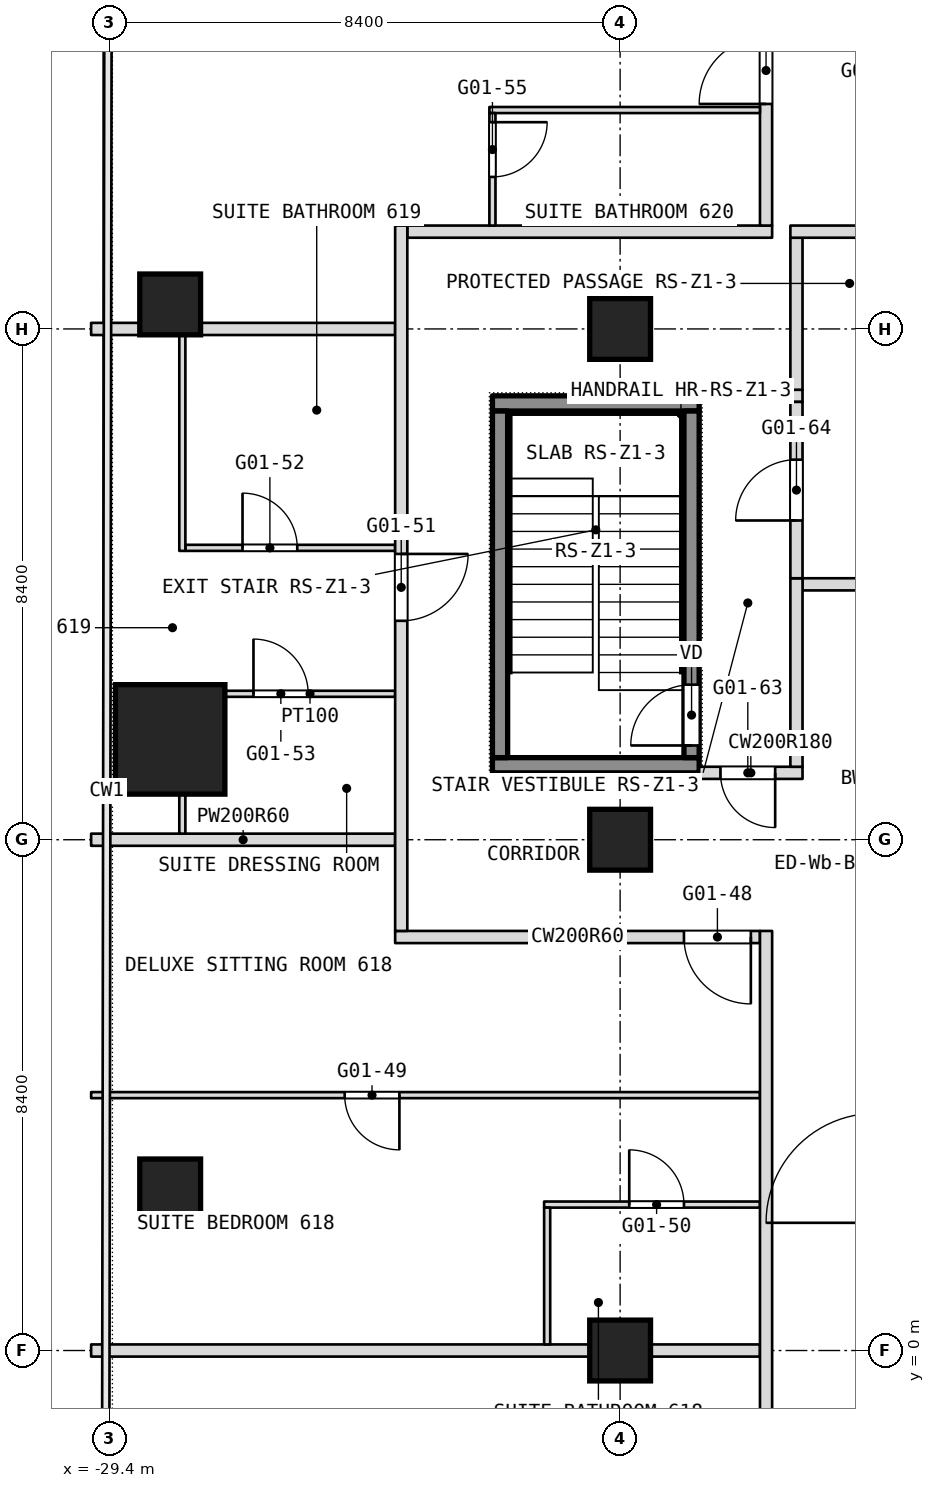
"""IFC4 building model, lengths in metres.
Left out: names, types, materials, properties, quantities, classifications, styles, units other than length and angle.
Written with IfcOpenShell. Run it as: python <this file> out.ifc"""

import sys

from ifc_helpers import new_model, si_unit, direction, frame, frame_2d, origin, origin_2d, place, context, subcontext, project, spatial, rectangle, extrude, element, fill, save


model = new_model("IFC4")
c1 = context("Model", 3, precision=1e-05, world=origin(), true_north=direction((0.0, 1.0)))
c2 = subcontext(c1, "Body", "Model", "MODEL_VIEW")
j1 = project(units=[si_unit("LENGTHUNIT", "METRE"), si_unit("PLANEANGLEUNIT", "RADIAN")], contexts=[c1])
p1 = place(None, origin())
s1 = spatial("IfcSite", under=j1, at=p1, CompositionType="ELEMENT")
p2 = place(p1, origin())
s2 = spatial("IfcBuilding", under=s1, at=p2, CompositionType="ELEMENT")
p3 = place(p2, frame((0.0, 0.0, 36.5)))
s3 = spatial("IfcBuildingStorey", under=s2, at=p3, CompositionType="ELEMENT", Elevation=36.5)
p4 = place(p3, frame((-28.4, 10.05, 0.0), z_axis=(0.0, 0.0, 1.0), x_axis=(1.0, 0.0, 0.0)))
e1 = element("IfcColumn", 1, at=p4, inside=s3, PredefinedType="COLUMN", context=c2, shape_type="SweptSolid", body=[
    extrude(rectangle(XDim=1.8, YDim=1.8, at=origin_2d()), origin(), (0.0, 0.0, 1.0), 3.6),
])
for number, where, z_axis, x_axis in (
    (2, (-21.0, 0.0, 0.0), (0.0, 0.0, 1.0), (1.0, 0.0, 0.0)),
    (3, (-21.0, 8.4, 0.0), (0.0, 0.0, 1.0), (1.0, 0.0, 0.0)),
    (4, (-21.0, 16.8, 0.0), (0.0, 0.0, 1.0), (1.0, 0.0, 0.0)),
    (5, (-28.4, 2.649, 0.0), (0.0, 0.0, 1.0), (1.0, 0.0, 0.0)),
    (6, (-28.4, 17.203, 0.0), (0.0, 0.0, 1.0), (1.0, 0.0, 0.0)),
):
    element("IfcColumn", number, at=place(p3, frame(where, z_axis=z_axis, x_axis=x_axis)), inside=s3, PredefinedType="COLUMN", context=c2, shape_type="SweptSolid", body=[
        extrude(rectangle(XDim=1.0, YDim=1.0, at=origin_2d()), origin(), (0.0, 0.0, 1.0), 3.6),
    ])
p5 = place(p3, frame((-29.7, 0.0, 0.0), z_axis=(0.0, 0.0, 1.0), x_axis=(1.0, 0.0, 0.0)))
e7 = element("IfcWall", 7, at=p5, inside=s3, PredefinedType="PARTITIONING", context=c2, shape_type="SweptSolid", body=[
    extrude(rectangle(XDim=11.0, YDim=0.2, at=frame_2d((5.5, 0.0))), origin(), (0.0, 0.0, 1.0), 2.84),
])
p6 = place(p3, frame((-22.25, 2.4, 0.0), z_axis=(0.0, 0.0, 1.0), x_axis=(1.0, 0.0, 0.0)))
e8 = element("IfcWall", 8, at=p6, inside=s3, PredefinedType="PARTITIONING", context=c2, shape_type="SweptSolid", body=[
    extrude(rectangle(XDim=3.55, YDim=0.1, at=frame_2d((1.775, 0.0))), origin(), (0.0, 0.0, 1.0), 3.34),
])
p7 = place(p6, frame((1.4, 0.0, 0.0)))
e9 = element("IfcOpeningElement", 9, at=p7, cuts=e8, PredefinedType="OPENING", context=c2, shape_type="SweptSolid", body=[
    extrude(rectangle(XDim=0.9, YDim=2.1, at=frame_2d((0.45, 1.05))), frame((0.0, 0.05, 0.0), z_axis=(0.0, -1.0, 0.0), x_axis=(1.0, 0.0, 0.0)), (0.0, 0.0, 1.0), 0.1),
])
p8 = place(p3, frame((-29.7, 4.2, 0.0), z_axis=(0.0, 0.0, 1.0), x_axis=(1.0, 0.0, 0.0)))
e10 = element("IfcWall", 10, at=p8, inside=s3, PredefinedType="PARTITIONING", context=c2, shape_type="SweptSolid", body=[
    extrude(rectangle(XDim=11.0, YDim=0.1, at=frame_2d((5.5, 0.0))), origin(), (0.0, 0.0, 1.0), 3.34),
])
p9 = place(p8, frame((4.17, 0.0, 0.0)))
e11 = element("IfcOpeningElement", 11, at=p9, cuts=e10, PredefinedType="OPENING", context=c2, shape_type="SweptSolid", body=[
    extrude(rectangle(XDim=0.9, YDim=2.1, at=frame_2d((0.45, 1.05))), frame((0.0, 0.05, 0.0), z_axis=(0.0, -1.0, 0.0), x_axis=(1.0, 0.0, 0.0)), (0.0, 0.0, 1.0), 0.1),
])
p10 = place(p3, frame((-24.7, 6.8, 0.0), z_axis=(0.0, 0.0, 1.0), x_axis=(1.0, 0.0, 0.0)))
e12 = element("IfcWall", 12, at=p10, inside=s3, PredefinedType="PARTITIONING", context=c2, shape_type="SweptSolid", body=[
    extrude(rectangle(XDim=6.0, YDim=0.2, at=frame_2d((3.0, 0.0))), origin(), (0.0, 0.0, 1.0), 3.34),
])
p11 = place(p10, frame((4.75, 0.0, 0.0)))
e13 = element("IfcOpeningElement", 13, at=p11, cuts=e12, PredefinedType="OPENING", context=c2, shape_type="SweptSolid", body=[
    extrude(rectangle(XDim=1.1, YDim=2.1, at=frame_2d((0.55, 1.05))), frame((0.0, 0.1, 0.0), z_axis=(0.0, -1.0, 0.0), x_axis=(1.0, 0.0, 0.0)), (0.0, 0.0, 1.0), 0.2),
])
p12 = place(p3, frame((-29.7, 8.4, 0.0), z_axis=(0.0, 0.0, 1.0), x_axis=(1.0, 0.0, 0.0)))
e14 = element("IfcWall", 14, at=p12, inside=s3, PredefinedType="PARTITIONING", context=c2, shape_type="SweptSolid", body=[
    extrude(rectangle(XDim=5.0, YDim=0.2, at=frame_2d((2.5, 0.0))), origin(), (0.0, 0.0, 1.0), 2.84),
])
p13 = place(p3, frame((-19.7, 9.5, 0.0), z_axis=(0.0, 0.0, 1.0), x_axis=(1.0, 0.0, 0.0)))
e15 = element("IfcWall", 15, at=p13, inside=s3, PredefinedType="PARTITIONING", context=c2, shape_type="SweptSolid", body=[
    extrude(rectangle(XDim=1.7, YDim=0.2, at=frame_2d((0.85, 0.0))), origin(), (0.0, 0.0, 1.0), 3.34),
])
p14 = place(p13, frame((0.35, 0.0, 0.0)))
e16 = element("IfcOpeningElement", 16, at=p14, cuts=e15, PredefinedType="OPENING", context=c2, shape_type="SweptSolid", body=[
    extrude(rectangle(XDim=0.9, YDim=2.1, at=frame_2d((0.45, 1.05))), frame((0.0, 0.1, 0.0), z_axis=(0.0, -1.0, 0.0), x_axis=(1.0, 0.0, 0.0)), (0.0, 0.0, 1.0), 0.2),
])
p15 = place(p3, frame((-27.5, 10.8, 0.0), z_axis=(0.0, 0.0, 1.0), x_axis=(1.0, 0.0, 0.0)))
e17 = element("IfcWall", 17, at=p15, inside=s3, PredefinedType="PARTITIONING", context=c2, shape_type="SweptSolid", body=[
    extrude(rectangle(XDim=2.8, YDim=0.1, at=frame_2d((1.4, 0.0))), origin(), (0.0, 0.0, 1.0), 3.34),
])
p16 = place(p15, frame((0.47, 0.0, 0.0)))
e18 = element("IfcOpeningElement", 18, at=p16, cuts=e17, PredefinedType="OPENING", context=c2, shape_type="SweptSolid", body=[
    extrude(rectangle(XDim=0.9, YDim=2.1, at=frame_2d((0.45, 1.05))), frame((0.0, 0.05, 0.0), z_axis=(0.0, -1.0, 0.0), x_axis=(1.0, 0.0, 0.0)), (0.0, 0.0, 1.0), 0.1),
])
p17 = place(p3, frame((-18.0, 12.6, 0.0), z_axis=(0.0, 0.0, 1.0), x_axis=(1.0, 0.0, 0.0)))
e19 = element("IfcWall", 19, at=p17, inside=s3, PredefinedType="PARTITIONING", context=c2, shape_type="SweptSolid", body=[
    extrude(rectangle(XDim=1.1, YDim=0.2, at=frame_2d((0.55, 0.0))), origin(), (0.0, 0.0, 1.0), 3.34),
])
p18 = place(p3, frame((-28.15, 13.2, 0.0), z_axis=(0.0, 0.0, 1.0), x_axis=(1.0, 0.0, 0.0)))
e20 = element("IfcWall", 20, at=p18, inside=s3, PredefinedType="PARTITIONING", context=c2, shape_type="SweptSolid", body=[
    extrude(rectangle(XDim=3.45, YDim=0.1, at=frame_2d((1.725, 0.0))), origin(), (0.0, 0.0, 1.0), 3.34),
])
p19 = place(p18, frame((0.94, 0.0, 0.0)))
e21 = element("IfcOpeningElement", 21, at=p19, cuts=e20, PredefinedType="OPENING", context=c2, shape_type="SweptSolid", body=[
    extrude(rectangle(XDim=0.9, YDim=2.1, at=frame_2d((0.45, 1.05))), frame((0.0, 0.05, 0.0), z_axis=(0.0, -1.0, 0.0), x_axis=(1.0, 0.0, 0.0)), (0.0, 0.0, 1.0), 0.1),
])
p20 = place(p3, frame((-19.7, 15.7, 0.0), z_axis=(0.0, 0.0, 1.0), x_axis=(1.0, 0.0, 0.0)))
e22 = element("IfcWall", 22, at=p20, inside=s3, PredefinedType="PARTITIONING", context=c2, shape_type="SweptSolid", body=[
    extrude(rectangle(XDim=1.7, YDim=0.2, at=frame_2d((0.85, 0.0))), origin(), (0.0, 0.0, 1.0), 3.34),
])
p21 = place(p3, frame((-29.7, 16.8, 0.0), z_axis=(0.0, 0.0, 1.0), x_axis=(1.0, 0.0, 0.0)))
e23 = element("IfcWall", 23, at=p21, inside=s3, PredefinedType="PARTITIONING", context=c2, shape_type="SweptSolid", body=[
    extrude(rectangle(XDim=5.0, YDim=0.2, at=frame_2d((2.5, 0.0))), origin(), (0.0, 0.0, 1.0), 2.84),
])
p22 = place(p3, frame((-18.1, 9.6, 0.0), z_axis=(0.0, 0.0, 1.0), x_axis=(0.0, 1.0, 0.0)))
e24 = element("IfcWall", 24, at=p22, inside=s3, PredefinedType="PARTITIONING", context=c2, shape_type="SweptSolid", body=[
    extrude(rectangle(XDim=3.1, YDim=0.2, at=frame_2d((1.55, 0.0))), origin(), (0.0, 0.0, 1.0), 3.34),
])
p23 = place(p3, frame((-18.1, 15.8, 0.0), z_axis=(0.0, 0.0, 1.0), x_axis=(0.0, 1.0, 0.0)))
e25 = element("IfcWall", 25, at=p23, inside=s3, PredefinedType="PARTITIONING", context=c2, shape_type="SweptSolid", body=[
    extrude(rectangle(XDim=2.5, YDim=0.2, at=frame_2d((1.25, 0.0))), origin(), (0.0, 0.0, 1.0), 3.34),
])
p24 = place(p3, frame((-18.1, 12.7, 0.0), z_axis=(0.0, 0.0, 1.0), x_axis=(0.0, 1.0, 0.0)))
e26 = element("IfcWall", 26, at=p24, inside=s3, PredefinedType="PARTITIONING", context=c2, shape_type="SweptSolid", body=[
    extrude(rectangle(XDim=2.9, YDim=0.2, at=frame_2d((1.45, 0.0))), origin(), (0.0, 0.0, 1.0), 3.34),
])
p25 = place(p24, frame((0.95, 0.0, 0.0)))
e27 = element("IfcOpeningElement", 27, at=p25, cuts=e26, PredefinedType="OPENING", context=c2, shape_type="SweptSolid", body=[
    extrude(rectangle(XDim=1.0, YDim=2.1, at=frame_2d((0.5, 1.05))), frame((0.0, 0.1, 0.0), z_axis=(0.0, -1.0, 0.0), x_axis=(1.0, 0.0, 0.0)), (0.0, 0.0, 1.0), 0.2),
])
p26 = place(p3, frame((-24.5, 18.4, 0.0), z_axis=(0.0, 0.0, 1.0), x_axis=(1.0, 0.0, 0.0)))
e28 = element("IfcWall", 28, at=p26, inside=s3, PredefinedType="PARTITIONING", context=c2, shape_type="SweptSolid", body=[
    extrude(rectangle(XDim=6.0, YDim=0.2, at=frame_2d((3.0, 0.0))), origin(), (0.0, 0.0, 1.0), 3.34),
])
p27 = place(p3, frame((-18.2, 18.4, 0.0), z_axis=(0.0, 0.0, 1.0), x_axis=(1.0, 0.0, 0.0)))
e29 = element("IfcWall", 29, at=p27, inside=s3, PredefinedType="PARTITIONING", context=c2, shape_type="SweptSolid", body=[
    extrude(rectangle(XDim=5.0, YDim=0.2, at=frame_2d((2.5, 0.0))), origin(), (0.0, 0.0, 1.0), 3.34),
])
p28 = place(p3, frame((-18.6, -16.665, 0.0), z_axis=(0.0, 0.0, 1.0), x_axis=(0.0, 1.0, 0.0)))
e30 = element("IfcWall", 30, at=p28, inside=s3, PredefinedType="PARTITIONING", context=c2, shape_type="SweptSolid", body=[
    extrude(rectangle(XDim=23.565, YDim=0.2, at=frame_2d((11.782, 0.0))), origin(), (0.0, 0.0, 1.0), 3.34),
])
p29 = place(p28, frame((2.991, 0.0, 0.0)))
e31 = element("IfcOpeningElement", 31, at=p29, cuts=e30, PredefinedType="OPENING", context=c2, shape_type="SweptSolid", body=[
    extrude(rectangle(XDim=1.0, YDim=2.1, at=frame_2d((0.5, 1.05))), frame((0.0, 0.1, 0.0), z_axis=(0.0, -1.0, 0.0), x_axis=(1.0, 0.0, 0.0)), (0.0, 0.0, 1.0), 0.2),
])
p30 = place(p28, frame((4.574, 0.0, 0.0)))
e32 = element("IfcOpeningElement", 32, at=p30, cuts=e30, PredefinedType="OPENING", context=c2, shape_type="SweptSolid", body=[
    extrude(rectangle(XDim=1.0, YDim=2.1, at=frame_2d((0.5, 1.05))), frame((0.0, 0.1, 0.0), z_axis=(0.0, -1.0, 0.0), x_axis=(1.0, 0.0, 0.0)), (0.0, 0.0, 1.0), 0.2),
])
p31 = place(p28, frame((11.565, 0.0, 0.0)))
e33 = element("IfcOpeningElement", 33, at=p31, cuts=e30, PredefinedType="OPENING", context=c2, shape_type="SweptSolid", body=[
    extrude(rectangle(XDim=1.8, YDim=2.1, at=frame_2d((0.9, 1.05))), frame((0.0, 0.1, 0.0), z_axis=(0.0, -1.0, 0.0), x_axis=(1.0, 0.0, 0.0)), (0.0, 0.0, 1.0), 0.2),
])
p32 = place(p3, frame((-18.6, 18.5, 0.0), z_axis=(0.0, 0.0, 1.0), x_axis=(0.0, 1.0, 0.0)))
e34 = element("IfcWall", 34, at=p32, inside=s3, PredefinedType="PARTITIONING", context=c2, shape_type="SweptSolid", body=[
    extrude(rectangle(XDim=15.04, YDim=0.2, at=frame_2d((7.52, 0.0))), origin(), (0.0, 0.0, 1.0), 3.34),
])
p33 = place(p32, frame((2.0, 0.0, 0.0)))
e35 = element("IfcOpeningElement", 35, at=p33, cuts=e34, PredefinedType="OPENING", context=c2, shape_type="SweptSolid", body=[
    extrude(rectangle(XDim=1.1, YDim=2.1, at=frame_2d((0.55, 1.05))), frame((0.0, 0.1, 0.0), z_axis=(0.0, -1.0, 0.0), x_axis=(1.0, 0.0, 0.0)), (0.0, 0.0, 1.0), 0.2),
])
p34 = place(p32, frame((8.25, 0.0, 0.0)))
e36 = element("IfcOpeningElement", 36, at=p34, cuts=e34, PredefinedType="OPENING", context=c2, shape_type="SweptSolid", body=[
    extrude(rectangle(XDim=1.1, YDim=2.1, at=frame_2d((0.55, 1.05))), frame((0.0, 0.1, 0.0), z_axis=(0.0, -1.0, 0.0), x_axis=(1.0, 0.0, 0.0)), (0.0, 0.0, 1.0), 0.2),
])
p35 = place(p3, frame((-23.15, 20.4, 0.0), z_axis=(0.0, 0.0, 1.0), x_axis=(1.0, 0.0, 0.0)))
e37 = element("IfcWall", 37, at=p35, inside=s3, PredefinedType="PARTITIONING", context=c2, shape_type="SweptSolid", body=[
    extrude(rectangle(XDim=4.45, YDim=0.1, at=frame_2d((2.225, 0.0))), origin(), (0.0, 0.0, 1.0), 3.34),
])
p36 = place(p3, frame((-22.2, 0.1, 0.0), z_axis=(0.0, 0.0, 1.0), x_axis=(0.0, 1.0, 0.0)))
e38 = element("IfcWall", 38, at=p36, inside=s3, PredefinedType="PARTITIONING", context=c2, shape_type="SweptSolid", body=[
    extrude(rectangle(XDim=2.25, YDim=0.1, at=frame_2d((1.125, 0.0))), origin(), (0.0, 0.0, 1.0), 3.34),
])
p37 = place(p3, frame((-23.1, 18.5, 0.0), z_axis=(0.0, 0.0, 1.0), x_axis=(0.0, 1.0, 0.0)))
e39 = element("IfcWall", 39, at=p37, inside=s3, PredefinedType="PARTITIONING", context=c2, shape_type="SweptSolid", body=[
    extrude(rectangle(XDim=1.85, YDim=0.1, at=frame_2d((0.925, 0.0))), origin(), (0.0, 0.0, 1.0), 3.34),
])
p38 = place(p37, frame((0.8, 0.0, 0.0)))
e40 = element("IfcOpeningElement", 40, at=p38, cuts=e39, PredefinedType="OPENING", context=c2, shape_type="SweptSolid", body=[
    extrude(rectangle(XDim=0.9, YDim=2.1, at=frame_2d((0.45, 1.05))), frame((0.0, 0.05, 0.0), z_axis=(0.0, -1.0, 0.0), x_axis=(1.0, 0.0, 0.0)), (0.0, 0.0, 1.0), 0.1),
])
p39 = place(p3, frame((-24.6, 6.9, 0.0), z_axis=(0.0, 0.0, 1.0), x_axis=(0.0, 1.0, 0.0)))
e41 = element("IfcWall", 41, at=p39, inside=s3, PredefinedType="PARTITIONING", context=c2, shape_type="SweptSolid", body=[
    extrude(rectangle(XDim=11.6, YDim=0.2, at=frame_2d((5.8, 0.0))), origin(), (0.0, 0.0, 1.0), 3.34),
])
p40 = place(p39, frame((5.1, 0.0, 0.0)))
e42 = element("IfcOpeningElement", 42, at=p40, cuts=e41, PredefinedType="OPENING", context=c2, shape_type="SweptSolid", body=[
    extrude(rectangle(XDim=1.1, YDim=2.1, at=frame_2d((0.55, 1.05))), frame((0.0, 0.1, 0.0), z_axis=(0.0, -1.0, 0.0), x_axis=(1.0, 0.0, 0.0)), (0.0, 0.0, 1.0), 0.2),
])
p41 = place(p3, frame((-28.2, 8.5, 0.0), z_axis=(0.0, 0.0, 1.0), x_axis=(0.0, 1.0, 0.0)))
e43 = element("IfcWall", 43, at=p41, inside=s3, PredefinedType="PARTITIONING", context=c2, shape_type="SweptSolid", body=[
    extrude(rectangle(XDim=0.65, YDim=0.1, at=frame_2d((0.325, 0.0))), origin(), (0.0, 0.0, 1.0), 2.94),
])
p42 = place(p3, frame((-28.2, 13.15, 0.0), z_axis=(0.0, 0.0, 1.0), x_axis=(0.0, 1.0, 0.0)))
e44 = element("IfcWall", 44, at=p42, inside=s3, PredefinedType="PARTITIONING", context=c2, shape_type="SweptSolid", body=[
    extrude(rectangle(XDim=3.75, YDim=0.1, at=frame_2d((1.875, 0.0))), origin(), (0.0, 0.0, 1.0), 2.94),
])
for number, where, z_axis, x_axis in (
    (45, (-23.1, 9.625, -0.15), (0.0, 0.0, 1.0), (1.0, 0.0, 0.0)),
    (46, (-23.1, 15.575, -0.15), (0.0, 0.0, 1.0), (1.0, 0.0, 0.0)),
):
    element("IfcWall", number, at=place(p3, frame(where, z_axis=z_axis, x_axis=x_axis)), inside=s3, PredefinedType="SHEAR", context=c2, shape_type="SweptSolid", body=[
        extrude(rectangle(XDim=3.4, YDim=0.25, at=frame_2d((1.7, 0.0))), origin(), (0.0, 0.0, 1.0), 3.85),
    ])
p43 = place(p3, frame((-22.975, 9.75, -0.15), z_axis=(0.0, 0.0, 1.0), x_axis=(0.0, 1.0, 0.0)))
e47 = element("IfcWall", 47, at=p43, inside=s3, PredefinedType="SHEAR", context=c2, shape_type="SweptSolid", body=[
    extrude(rectangle(XDim=5.7, YDim=0.25, at=frame_2d((2.85, 0.0))), origin(), (0.0, 0.0, 1.0), 3.85),
])
p44 = place(p3, frame((-19.825, 9.75, -0.15), z_axis=(0.0, 0.0, 1.0), x_axis=(0.0, 1.0, 0.0)))
e48 = element("IfcWall", 48, at=p44, inside=s3, PredefinedType="SHEAR", context=c2, shape_type="SweptSolid", body=[
    extrude(rectangle(XDim=5.7, YDim=0.25, at=frame_2d((2.85, 0.0))), origin(), (0.0, 0.0, 1.0), 3.85),
])
p45 = place(p44, frame((0.2, 0.0, 0.0)))
e49 = element("IfcOpeningElement", 49, at=p45, cuts=e48, PredefinedType="OPENING", context=c2, shape_type="SweptSolid", body=[
    extrude(rectangle(XDim=1.0, YDim=2.1, at=frame_2d((0.5, 1.05))), frame((0.0, 0.125, 0.0), z_axis=(0.0, -1.0, 0.0), x_axis=(1.0, 0.0, 0.0)), (0.0, 0.0, 1.0), 0.25),
])
p46 = place(p7, origin())
e50 = element("IfcDoor", 50, at=p46, inside=s3, OperationType="SINGLE_SWING_LEFT", PredefinedType="DOOR", context=c2, shape_type="SweptSolid", body=[
    extrude(rectangle(XDim=0.9, YDim=2.1, at=frame_2d((0.45, 1.05))), frame((0.0, 0.025, 0.0), z_axis=(0.0, -1.0, 0.0), x_axis=(1.0, 0.0, 0.0)), (0.0, 0.0, 1.0), 0.05),
])
fill(e9, e50)
p47 = place(p9, origin())
e51 = element("IfcDoor", 51, at=p47, inside=s3, OperationType="SINGLE_SWING_LEFT", PredefinedType="DOOR", context=c2, shape_type="SweptSolid", body=[
    extrude(rectangle(XDim=0.9, YDim=2.1, at=frame_2d((0.45, 1.05))), frame((0.0, 0.025, 0.0), z_axis=(0.0, -1.0, 0.0), x_axis=(1.0, 0.0, 0.0)), (0.0, 0.0, 1.0), 0.05),
])
fill(e11, e51)
p48 = place(p11, origin())
e52 = element("IfcDoor", 52, at=p48, inside=s3, OperationType="SINGLE_SWING_LEFT", PredefinedType="DOOR", context=c2, shape_type="SweptSolid", body=[
    extrude(rectangle(XDim=1.1, YDim=2.1, at=frame_2d((0.55, 1.05))), frame((0.0, 0.025, 0.0), z_axis=(0.0, -1.0, 0.0), x_axis=(1.0, 0.0, 0.0)), (0.0, 0.0, 1.0), 0.05),
])
fill(e13, e52)
p49 = place(p14, origin())
e53 = element("IfcDoor", 53, at=p49, inside=s3, OperationType="SINGLE_SWING_RIGHT", PredefinedType="DOOR", context=c2, shape_type="SweptSolid", body=[
    extrude(rectangle(XDim=0.9, YDim=2.1, at=frame_2d((0.45, 1.05))), frame((0.0, 0.025, 0.0), z_axis=(0.0, -1.0, 0.0), x_axis=(1.0, 0.0, 0.0)), (0.0, 0.0, 1.0), 0.05),
])
fill(e16, e53)
p50 = place(p16, origin())
e54 = element("IfcDoor", 54, at=p50, inside=s3, OperationType="SINGLE_SWING_RIGHT", PredefinedType="DOOR", context=c2, shape_type="SweptSolid", body=[
    extrude(rectangle(XDim=0.9, YDim=2.1, at=frame_2d((0.45, 1.05))), frame((0.0, 0.025, 0.0), z_axis=(0.0, -1.0, 0.0), x_axis=(1.0, 0.0, 0.0)), (0.0, 0.0, 1.0), 0.05),
])
fill(e18, e54)
p51 = place(p19, origin())
e55 = element("IfcDoor", 55, at=p51, inside=s3, OperationType="SINGLE_SWING_LEFT", PredefinedType="DOOR", context=c2, shape_type="SweptSolid", body=[
    extrude(rectangle(XDim=0.9, YDim=2.1, at=frame_2d((0.45, 1.05))), frame((0.0, 0.025, 0.0), z_axis=(0.0, -1.0, 0.0), x_axis=(1.0, 0.0, 0.0)), (0.0, 0.0, 1.0), 0.05),
])
fill(e21, e55)
p52 = place(p25, origin())
e56 = element("IfcDoor", 56, at=p52, inside=s3, OperationType="SINGLE_SWING_RIGHT", PredefinedType="DOOR", context=c2, shape_type="SweptSolid", body=[
    extrude(rectangle(XDim=1.0, YDim=2.1, at=frame_2d((0.5, 1.05))), frame((0.0, 0.025, 0.0), z_axis=(0.0, -1.0, 0.0), x_axis=(1.0, 0.0, 0.0)), (0.0, 0.0, 1.0), 0.05),
])
fill(e27, e56)
p53 = place(p33, origin())
e57 = element("IfcDoor", 57, at=p53, inside=s3, OperationType="SINGLE_SWING_LEFT", PredefinedType="DOOR", context=c2, shape_type="SweptSolid", body=[
    extrude(rectangle(XDim=1.1, YDim=2.1, at=frame_2d((0.55, 1.05))), frame((0.0, 0.025, 0.0), z_axis=(0.0, -1.0, 0.0), x_axis=(1.0, 0.0, 0.0)), (0.0, 0.0, 1.0), 0.05),
])
fill(e35, e57)
p54 = place(p38, origin())
e58 = element("IfcDoor", 58, at=p54, inside=s3, OperationType="SINGLE_SWING_LEFT", PredefinedType="DOOR", context=c2, shape_type="SweptSolid", body=[
    extrude(rectangle(XDim=0.9, YDim=2.1, at=frame_2d((0.45, 1.05))), frame((0.0, 0.025, 0.0), z_axis=(0.0, -1.0, 0.0), x_axis=(1.0, 0.0, 0.0)), (0.0, 0.0, 1.0), 0.05),
])
fill(e40, e58)
p55 = place(p40, origin())
e59 = element("IfcDoor", 59, at=p55, inside=s3, OperationType="SINGLE_SWING_RIGHT", PredefinedType="DOOR", context=c2, shape_type="SweptSolid", body=[
    extrude(rectangle(XDim=1.1, YDim=2.1, at=frame_2d((0.55, 1.05))), frame((0.0, 0.025, 0.0), z_axis=(0.0, -1.0, 0.0), x_axis=(1.0, 0.0, 0.0)), (0.0, 0.0, 1.0), 0.05),
])
fill(e42, e59)
p56 = place(p45, origin())
e60 = element("IfcDoor", 60, at=p56, inside=s3, OperationType="SINGLE_SWING_LEFT", PredefinedType="DOOR", context=c2, shape_type="SweptSolid", body=[
    extrude(rectangle(XDim=1.0, YDim=2.1, at=frame_2d((0.5, 1.05))), frame((0.0, 0.025, 0.0), z_axis=(0.0, -1.0, 0.0), x_axis=(1.0, 0.0, 0.0)), (0.0, 0.0, 1.0), 0.05),
])
fill(e49, e60)
save(model, sys.argv[1])
